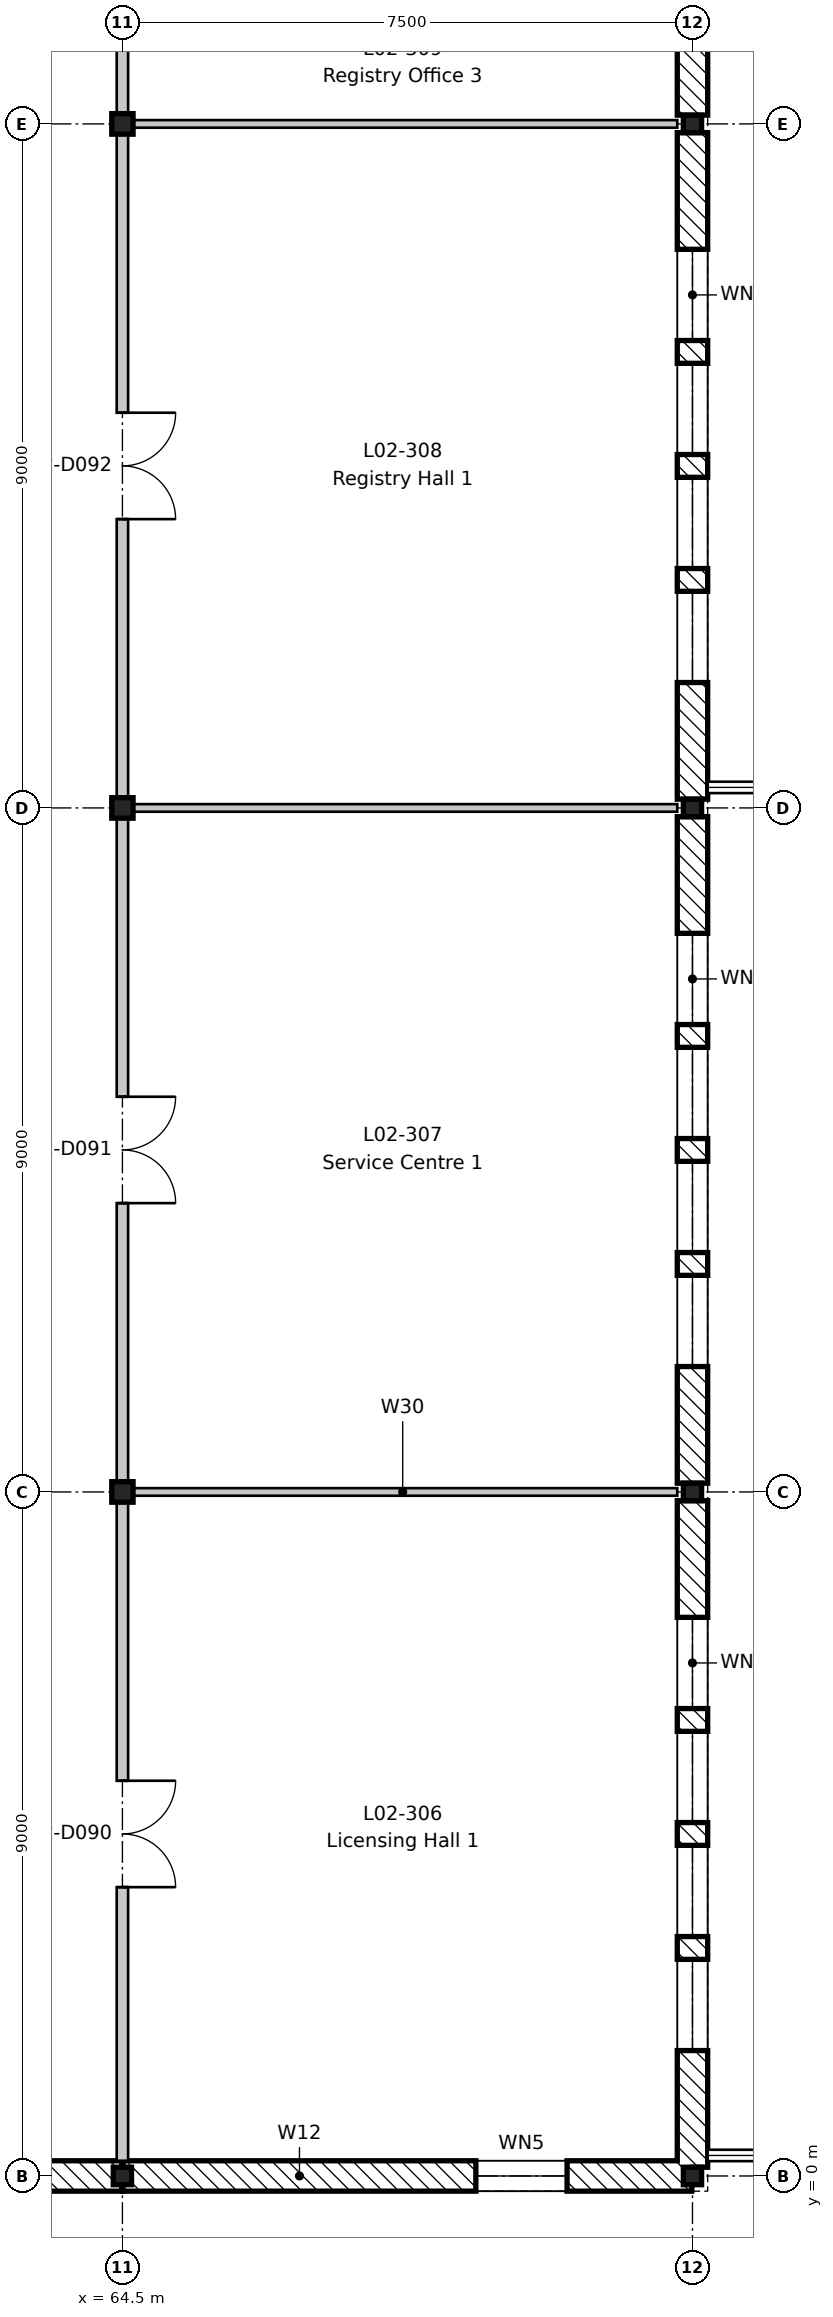
"""IFC4 building model, lengths in metres.
Left out: names, types, materials, properties, quantities, classifications, styles, units other than length and angle.
Written with IfcOpenShell. Run it as: python <this file> out.ifc"""

import sys

from ifc_helpers import new_model, si_unit, direction, frame, frame_2d, origin, origin_2d, place, context, subcontext, project, spatial, rectangle, i_section, extrude, element, fill, save


model = new_model("IFC4")
c1 = context("Model", 3, precision=1e-05, world=origin(), true_north=direction((0.0, 1.0)))
c2 = subcontext(c1, "Body", "Model", "MODEL_VIEW")
j1 = project(units=[si_unit("LENGTHUNIT", "METRE"), si_unit("PLANEANGLEUNIT", "RADIAN")], contexts=[c1])
p1 = place(None, origin())
s1 = spatial("IfcSite", under=j1, at=p1, CompositionType="ELEMENT")
p2 = place(p1, origin())
s2 = spatial("IfcBuilding", under=s1, at=p2, CompositionType="ELEMENT")
p3 = place(p2, frame((0.0, 0.0, 9.9)))
s3 = spatial("IfcBuildingStorey", under=s2, at=p3, CompositionType="ELEMENT", Elevation=9.9)
p4 = place(p3, frame((64.5, 0.0, -0.2), z_axis=(0.0, 0.0, 1.0), x_axis=(1.0, 0.0, 0.0)))
e1 = element("IfcColumn", 1, at=p4, inside=s3, PredefinedType="COLUMN", context=c2, shape_type="SweptSolid", body=[
    extrude(i_section(OverallWidth=0.24, OverallDepth=0.23, WebThickness=0.008, FlangeThickness=0.012, FilletRadius=0.021, at=origin_2d()), origin(), (0.0, 0.0, 1.0), 4.5),
])
for number, where, z_axis, x_axis in (
    (2, (64.5, 9.0, -0.2), (0.0, 0.0, 1.0), (1.0, 0.0, 0.0)),
    (3, (64.5, 18.0, -0.2), (0.0, 0.0, 1.0), (1.0, 0.0, 0.0)),
    (4, (64.5, 27.0, -0.2), (0.0, 0.0, 1.0), (1.0, 0.0, 0.0)),
):
    element("IfcColumn", number, at=place(p3, frame(where, z_axis=z_axis, x_axis=x_axis)), inside=s3, PredefinedType="COLUMN", context=c2, shape_type="SweptSolid", body=[
        extrude(i_section(OverallWidth=0.28, OverallDepth=0.27, WebThickness=0.008, FlangeThickness=0.013, FilletRadius=0.024, at=origin_2d()), origin(), (0.0, 0.0, 1.0), 4.5),
    ])
for number, where, z_axis, x_axis in (
    (5, (72.0, 0.0, -0.2), (0.0, 0.0, 1.0), (1.0, 0.0, 0.0)),
    (6, (72.0, 9.0, -0.2), (0.0, 0.0, 1.0), (1.0, 0.0, 0.0)),
    (7, (72.0, 18.0, -0.2), (0.0, 0.0, 1.0), (1.0, 0.0, 0.0)),
    (8, (72.0, 27.0, -0.2), (0.0, 0.0, 1.0), (1.0, 0.0, 0.0)),
):
    element("IfcColumn", number, at=place(p3, frame(where, z_axis=z_axis, x_axis=x_axis)), inside=s3, PredefinedType="COLUMN", context=c2, shape_type="SweptSolid", body=[
        extrude(i_section(OverallWidth=0.24, OverallDepth=0.23, WebThickness=0.008, FlangeThickness=0.012, FilletRadius=0.021, at=origin_2d()), origin(), (0.0, 0.0, 1.0), 4.5),
    ])
p5 = place(p3, frame((72.0, 8.885, 0.0), z_axis=(0.0, 0.0, 1.0), x_axis=(0.0, -1.0, 0.0)))
e9 = element("IfcWall", 9, at=p5, inside=s3, PredefinedType="STANDARD", context=c2, shape_type="SweptSolid", body=[
    extrude(rectangle(XDim=8.77, YDim=0.4, at=frame_2d((4.385, 0.0))), origin(), (0.0, 0.0, 1.0), 3.9),
])
p6 = place(p5, frame((6.035, 0.0, 0.6)))
e10 = element("IfcOpeningElement", 10, at=p6, cuts=e9, PredefinedType="OPENING", context=c2, shape_type="SweptSolid", body=[
    extrude(rectangle(XDim=1.2, YDim=3.0, at=frame_2d((0.6, 1.5))), frame((0.0, 0.21, 0.0), z_axis=(0.0, -1.0, 0.0), x_axis=(1.0, 0.0, 0.0)), (0.0, 0.0, 1.0), 0.42),
])
p7 = place(p5, frame((4.535, 0.0, 0.6)))
e11 = element("IfcOpeningElement", 11, at=p7, cuts=e9, PredefinedType="OPENING", context=c2, shape_type="SweptSolid", body=[
    extrude(rectangle(XDim=1.2, YDim=3.0, at=frame_2d((0.6, 1.5))), frame((0.0, 0.21, 0.0), z_axis=(0.0, -1.0, 0.0), x_axis=(1.0, 0.0, 0.0)), (0.0, 0.0, 1.0), 0.42),
])
p8 = place(p5, frame((3.035, 0.0, 0.6)))
e12 = element("IfcOpeningElement", 12, at=p8, cuts=e9, PredefinedType="OPENING", context=c2, shape_type="SweptSolid", body=[
    extrude(rectangle(XDim=1.2, YDim=3.0, at=frame_2d((0.6, 1.5))), frame((0.0, 0.21, 0.0), z_axis=(0.0, -1.0, 0.0), x_axis=(1.0, 0.0, 0.0)), (0.0, 0.0, 1.0), 0.42),
])
p9 = place(p5, frame((1.535, 0.0, 0.6)))
e13 = element("IfcOpeningElement", 13, at=p9, cuts=e9, PredefinedType="OPENING", context=c2, shape_type="SweptSolid", body=[
    extrude(rectangle(XDim=1.2, YDim=3.0, at=frame_2d((0.6, 1.5))), frame((0.0, 0.21, 0.0), z_axis=(0.0, -1.0, 0.0), x_axis=(1.0, 0.0, 0.0)), (0.0, 0.0, 1.0), 0.42),
])
p10 = place(p3, frame((72.0, 17.885, 0.0), z_axis=(0.0, 0.0, 1.0), x_axis=(0.0, -1.0, 0.0)))
e14 = element("IfcWall", 14, at=p10, inside=s3, PredefinedType="STANDARD", context=c2, shape_type="SweptSolid", body=[
    extrude(rectangle(XDim=8.77, YDim=0.4, at=frame_2d((4.385, 0.0))), origin(), (0.0, 0.0, 1.0), 3.9),
])
p11 = place(p10, frame((6.035, 0.0, 0.6)))
e15 = element("IfcOpeningElement", 15, at=p11, cuts=e14, PredefinedType="OPENING", context=c2, shape_type="SweptSolid", body=[
    extrude(rectangle(XDim=1.2, YDim=3.0, at=frame_2d((0.6, 1.5))), frame((0.0, 0.21, 0.0), z_axis=(0.0, -1.0, 0.0), x_axis=(1.0, 0.0, 0.0)), (0.0, 0.0, 1.0), 0.42),
])
p12 = place(p10, frame((4.535, 0.0, 0.6)))
e16 = element("IfcOpeningElement", 16, at=p12, cuts=e14, PredefinedType="OPENING", context=c2, shape_type="SweptSolid", body=[
    extrude(rectangle(XDim=1.2, YDim=3.0, at=frame_2d((0.6, 1.5))), frame((0.0, 0.21, 0.0), z_axis=(0.0, -1.0, 0.0), x_axis=(1.0, 0.0, 0.0)), (0.0, 0.0, 1.0), 0.42),
])
p13 = place(p10, frame((3.035, 0.0, 0.6)))
e17 = element("IfcOpeningElement", 17, at=p13, cuts=e14, PredefinedType="OPENING", context=c2, shape_type="SweptSolid", body=[
    extrude(rectangle(XDim=1.2, YDim=3.0, at=frame_2d((0.6, 1.5))), frame((0.0, 0.21, 0.0), z_axis=(0.0, -1.0, 0.0), x_axis=(1.0, 0.0, 0.0)), (0.0, 0.0, 1.0), 0.42),
])
p14 = place(p10, frame((1.535, 0.0, 0.6)))
e18 = element("IfcOpeningElement", 18, at=p14, cuts=e14, PredefinedType="OPENING", context=c2, shape_type="SweptSolid", body=[
    extrude(rectangle(XDim=1.2, YDim=3.0, at=frame_2d((0.6, 1.5))), frame((0.0, 0.21, 0.0), z_axis=(0.0, -1.0, 0.0), x_axis=(1.0, 0.0, 0.0)), (0.0, 0.0, 1.0), 0.42),
])
p15 = place(p3, frame((72.0, 26.885, 0.0), z_axis=(0.0, 0.0, 1.0), x_axis=(0.0, -1.0, 0.0)))
e19 = element("IfcWall", 19, at=p15, inside=s3, PredefinedType="STANDARD", context=c2, shape_type="SweptSolid", body=[
    extrude(rectangle(XDim=8.77, YDim=0.4, at=frame_2d((4.385, 0.0))), origin(), (0.0, 0.0, 1.0), 3.9),
])
p16 = place(p15, frame((6.035, 0.0, 0.6)))
e20 = element("IfcOpeningElement", 20, at=p16, cuts=e19, PredefinedType="OPENING", context=c2, shape_type="SweptSolid", body=[
    extrude(rectangle(XDim=1.2, YDim=3.0, at=frame_2d((0.6, 1.5))), frame((0.0, 0.21, 0.0), z_axis=(0.0, -1.0, 0.0), x_axis=(1.0, 0.0, 0.0)), (0.0, 0.0, 1.0), 0.42),
])
p17 = place(p15, frame((4.535, 0.0, 0.6)))
e21 = element("IfcOpeningElement", 21, at=p17, cuts=e19, PredefinedType="OPENING", context=c2, shape_type="SweptSolid", body=[
    extrude(rectangle(XDim=1.2, YDim=3.0, at=frame_2d((0.6, 1.5))), frame((0.0, 0.21, 0.0), z_axis=(0.0, -1.0, 0.0), x_axis=(1.0, 0.0, 0.0)), (0.0, 0.0, 1.0), 0.42),
])
p18 = place(p15, frame((3.035, 0.0, 0.6)))
e22 = element("IfcOpeningElement", 22, at=p18, cuts=e19, PredefinedType="OPENING", context=c2, shape_type="SweptSolid", body=[
    extrude(rectangle(XDim=1.2, YDim=3.0, at=frame_2d((0.6, 1.5))), frame((0.0, 0.21, 0.0), z_axis=(0.0, -1.0, 0.0), x_axis=(1.0, 0.0, 0.0)), (0.0, 0.0, 1.0), 0.42),
])
p19 = place(p15, frame((1.535, 0.0, 0.6)))
e23 = element("IfcOpeningElement", 23, at=p19, cuts=e19, PredefinedType="OPENING", context=c2, shape_type="SweptSolid", body=[
    extrude(rectangle(XDim=1.2, YDim=3.0, at=frame_2d((0.6, 1.5))), frame((0.0, 0.21, 0.0), z_axis=(0.0, -1.0, 0.0), x_axis=(1.0, 0.0, 0.0)), (0.0, 0.0, 1.0), 0.42),
])
p20 = place(p3, frame((72.0, 35.885, 0.0), z_axis=(0.0, 0.0, 1.0), x_axis=(0.0, -1.0, 0.0)))
e24 = element("IfcWall", 24, at=p20, inside=s3, PredefinedType="STANDARD", context=c2, shape_type="SweptSolid", body=[
    extrude(rectangle(XDim=8.77, YDim=0.4, at=frame_2d((4.385, 0.0))), origin(), (0.0, 0.0, 1.0), 3.9),
])
p21 = place(p20, frame((6.035, 0.0, 0.6)))
e25 = element("IfcOpeningElement", 25, at=p21, cuts=e24, PredefinedType="OPENING", context=c2, shape_type="SweptSolid", body=[
    extrude(rectangle(XDim=1.2, YDim=3.0, at=frame_2d((0.6, 1.5))), frame((0.0, 0.21, 0.0), z_axis=(0.0, -1.0, 0.0), x_axis=(1.0, 0.0, 0.0)), (0.0, 0.0, 1.0), 0.42),
])
p22 = place(p20, frame((4.535, 0.0, 0.6)))
e26 = element("IfcOpeningElement", 26, at=p22, cuts=e24, PredefinedType="OPENING", context=c2, shape_type="SweptSolid", body=[
    extrude(rectangle(XDim=1.2, YDim=3.0, at=frame_2d((0.6, 1.5))), frame((0.0, 0.21, 0.0), z_axis=(0.0, -1.0, 0.0), x_axis=(1.0, 0.0, 0.0)), (0.0, 0.0, 1.0), 0.42),
])
p23 = place(p20, frame((3.035, 0.0, 0.6)))
e27 = element("IfcOpeningElement", 27, at=p23, cuts=e24, PredefinedType="OPENING", context=c2, shape_type="SweptSolid", body=[
    extrude(rectangle(XDim=1.2, YDim=3.0, at=frame_2d((0.6, 1.5))), frame((0.0, 0.21, 0.0), z_axis=(0.0, -1.0, 0.0), x_axis=(1.0, 0.0, 0.0)), (0.0, 0.0, 1.0), 0.42),
])
p24 = place(p20, frame((1.535, 0.0, 0.6)))
e28 = element("IfcOpeningElement", 28, at=p24, cuts=e24, PredefinedType="OPENING", context=c2, shape_type="SweptSolid", body=[
    extrude(rectangle(XDim=1.2, YDim=3.0, at=frame_2d((0.6, 1.5))), frame((0.0, 0.21, 0.0), z_axis=(0.0, -1.0, 0.0), x_axis=(1.0, 0.0, 0.0)), (0.0, 0.0, 1.0), 0.42),
])
p25 = place(p3, frame((64.491, 0.0, 0.0), z_axis=(0.0, 0.0, 1.0), x_axis=(-1.0, 0.0, 0.0)))
e29 = element("IfcWall", 29, at=p25, inside=s3, PredefinedType="STANDARD", context=c2, shape_type="SweptSolid", body=[
    extrude(rectangle(XDim=2.982, YDim=0.4, at=frame_2d((1.491, 0.0))), origin(), (0.0, 0.0, 1.0), 4.1),
])
p26 = place(p3, frame((71.991, 0.0, 0.0), z_axis=(0.0, 0.0, 1.0), x_axis=(-1.0, 0.0, 0.0)))
e30 = element("IfcWall", 30, at=p26, inside=s3, PredefinedType="STANDARD", context=c2, shape_type="SweptSolid", body=[
    extrude(rectangle(XDim=7.482, YDim=0.4, at=frame_2d((3.741, 0.0))), origin(), (0.0, 0.0, 1.0), 3.97),
])
p27 = place(p26, frame((1.641, 0.0, 0.6)))
e31 = element("IfcOpeningElement", 31, at=p27, cuts=e30, PredefinedType="OPENING", context=c2, shape_type="SweptSolid", body=[
    extrude(rectangle(XDim=1.2, YDim=3.0, at=frame_2d((0.6, 1.5))), frame((0.0, 0.21, 0.0), z_axis=(0.0, -1.0, 0.0), x_axis=(1.0, 0.0, 0.0)), (0.0, 0.0, 1.0), 0.42),
])
for number, where, z_axis, x_axis in (
    (32, (64.575, 9.0, 0.0), (0.0, 0.0, 1.0), (1.0, 0.0, 0.0)),
    (33, (64.575, 18.0, 0.0), (0.0, 0.0, 1.0), (1.0, 0.0, 0.0)),
    (34, (64.575, 27.0, 0.0), (0.0, 0.0, 1.0), (1.0, 0.0, 0.0)),
):
    element("IfcWall", number, at=place(p3, frame(where, z_axis=z_axis, x_axis=x_axis)), inside=s3, PredefinedType="PARTITIONING", context=c2, shape_type="SweptSolid", body=[
        extrude(rectangle(XDim=7.225, YDim=0.1, at=frame_2d((3.613, 0.0))), origin(), (0.0, 0.0, 1.0), 3.95),
    ])
p28 = place(p3, frame((64.5, 0.2, 0.0), z_axis=(0.0, 0.0, 1.0), x_axis=(0.0, 1.0, 0.0)))
e35 = element("IfcWall", 35, at=p28, inside=s3, PredefinedType="PARTITIONING", context=c2, shape_type="SweptSolid", body=[
    extrude(rectangle(XDim=53.6, YDim=0.15, at=frame_2d((26.8, 0.0))), origin(), (0.0, 0.0, 1.0), 3.78),
])
p29 = place(p28, frame((3.6, 0.0, 0.0)))
e36 = element("IfcOpeningElement", 36, at=p29, cuts=e35, PredefinedType="OPENING", context=c2, shape_type="SweptSolid", body=[
    extrude(rectangle(XDim=1.4, YDim=2.1, at=frame_2d((0.7, 1.05))), frame((0.0, 0.085, 0.0), z_axis=(0.0, -1.0, 0.0), x_axis=(1.0, 0.0, 0.0)), (0.0, 0.0, 1.0), 0.17),
])
p30 = place(p28, frame((12.6, 0.0, 0.0)))
e37 = element("IfcOpeningElement", 37, at=p30, cuts=e35, PredefinedType="OPENING", context=c2, shape_type="SweptSolid", body=[
    extrude(rectangle(XDim=1.4, YDim=2.1, at=frame_2d((0.7, 1.05))), frame((0.0, 0.085, 0.0), z_axis=(0.0, -1.0, 0.0), x_axis=(1.0, 0.0, 0.0)), (0.0, 0.0, 1.0), 0.17),
])
p31 = place(p28, frame((21.6, 0.0, 0.0)))
e38 = element("IfcOpeningElement", 38, at=p31, cuts=e35, PredefinedType="OPENING", context=c2, shape_type="SweptSolid", body=[
    extrude(rectangle(XDim=1.4, YDim=2.1, at=frame_2d((0.7, 1.05))), frame((0.0, 0.085, 0.0), z_axis=(0.0, -1.0, 0.0), x_axis=(1.0, 0.0, 0.0)), (0.0, 0.0, 1.0), 0.17),
])
p32 = place(p28, frame((27.8, 0.0, 0.0)))
e39 = element("IfcOpeningElement", 39, at=p32, cuts=e35, PredefinedType="OPENING", context=c2, shape_type="SweptSolid", body=[
    extrude(rectangle(XDim=1.0, YDim=2.1, at=frame_2d((0.5, 1.05))), frame((0.0, 0.085, 0.0), z_axis=(0.0, -1.0, 0.0), x_axis=(1.0, 0.0, 0.0)), (0.0, 0.0, 1.0), 0.17),
])
p33 = place(p28, frame((32.3, 0.0, 0.0)))
e40 = element("IfcOpeningElement", 40, at=p33, cuts=e35, PredefinedType="OPENING", context=c2, shape_type="SweptSolid", body=[
    extrude(rectangle(XDim=1.0, YDim=2.1, at=frame_2d((0.5, 1.05))), frame((0.0, 0.085, 0.0), z_axis=(0.0, -1.0, 0.0), x_axis=(1.0, 0.0, 0.0)), (0.0, 0.0, 1.0), 0.17),
])
p34 = place(p28, frame((39.6, 0.0, 0.0)))
e41 = element("IfcOpeningElement", 41, at=p34, cuts=e35, PredefinedType="OPENING", context=c2, shape_type="SweptSolid", body=[
    extrude(rectangle(XDim=1.4, YDim=2.1, at=frame_2d((0.7, 1.05))), frame((0.0, 0.085, 0.0), z_axis=(0.0, -1.0, 0.0), x_axis=(1.0, 0.0, 0.0)), (0.0, 0.0, 1.0), 0.17),
])
p35 = place(p28, frame((48.6, 0.0, 0.0)))
e42 = element("IfcOpeningElement", 42, at=p35, cuts=e35, PredefinedType="OPENING", context=c2, shape_type="SweptSolid", body=[
    extrude(rectangle(XDim=1.4, YDim=2.1, at=frame_2d((0.7, 1.05))), frame((0.0, 0.085, 0.0), z_axis=(0.0, -1.0, 0.0), x_axis=(1.0, 0.0, 0.0)), (0.0, 0.0, 1.0), 0.17),
])
p36 = place(p6, origin())
e43 = element("IfcWindow", 43, at=p36, inside=s3, PartitioningType="SINGLE_PANEL", PredefinedType="WINDOW", context=c2, shape_type="SweptSolid", body=[
    extrude(rectangle(XDim=1.2, YDim=3.0, at=frame_2d((0.6, 1.5))), frame((0.0, 0.03, 0.0), z_axis=(0.0, -1.0, 0.0), x_axis=(1.0, 0.0, 0.0)), (0.0, 0.0, 1.0), 0.06),
])
fill(e10, e43)
p37 = place(p7, origin())
e44 = element("IfcWindow", 44, at=p37, inside=s3, PartitioningType="SINGLE_PANEL", PredefinedType="WINDOW", context=c2, shape_type="SweptSolid", body=[
    extrude(rectangle(XDim=1.2, YDim=3.0, at=frame_2d((0.6, 1.5))), frame((0.0, 0.03, 0.0), z_axis=(0.0, -1.0, 0.0), x_axis=(1.0, 0.0, 0.0)), (0.0, 0.0, 1.0), 0.06),
])
fill(e11, e44)
p38 = place(p8, origin())
e45 = element("IfcWindow", 45, at=p38, inside=s3, PartitioningType="SINGLE_PANEL", PredefinedType="WINDOW", context=c2, shape_type="SweptSolid", body=[
    extrude(rectangle(XDim=1.2, YDim=3.0, at=frame_2d((0.6, 1.5))), frame((0.0, 0.03, 0.0), z_axis=(0.0, -1.0, 0.0), x_axis=(1.0, 0.0, 0.0)), (0.0, 0.0, 1.0), 0.06),
])
fill(e12, e45)
p39 = place(p9, origin())
e46 = element("IfcWindow", 46, at=p39, inside=s3, PartitioningType="SINGLE_PANEL", PredefinedType="WINDOW", context=c2, shape_type="SweptSolid", body=[
    extrude(rectangle(XDim=1.2, YDim=3.0, at=frame_2d((0.6, 1.5))), frame((0.0, 0.03, 0.0), z_axis=(0.0, -1.0, 0.0), x_axis=(1.0, 0.0, 0.0)), (0.0, 0.0, 1.0), 0.06),
])
fill(e13, e46)
p40 = place(p11, origin())
e47 = element("IfcWindow", 47, at=p40, inside=s3, PartitioningType="SINGLE_PANEL", PredefinedType="WINDOW", context=c2, shape_type="SweptSolid", body=[
    extrude(rectangle(XDim=1.2, YDim=3.0, at=frame_2d((0.6, 1.5))), frame((0.0, 0.03, 0.0), z_axis=(0.0, -1.0, 0.0), x_axis=(1.0, 0.0, 0.0)), (0.0, 0.0, 1.0), 0.06),
])
fill(e15, e47)
p41 = place(p12, origin())
e48 = element("IfcWindow", 48, at=p41, inside=s3, PartitioningType="SINGLE_PANEL", PredefinedType="WINDOW", context=c2, shape_type="SweptSolid", body=[
    extrude(rectangle(XDim=1.2, YDim=3.0, at=frame_2d((0.6, 1.5))), frame((0.0, 0.03, 0.0), z_axis=(0.0, -1.0, 0.0), x_axis=(1.0, 0.0, 0.0)), (0.0, 0.0, 1.0), 0.06),
])
fill(e16, e48)
p42 = place(p13, origin())
e49 = element("IfcWindow", 49, at=p42, inside=s3, PartitioningType="SINGLE_PANEL", PredefinedType="WINDOW", context=c2, shape_type="SweptSolid", body=[
    extrude(rectangle(XDim=1.2, YDim=3.0, at=frame_2d((0.6, 1.5))), frame((0.0, 0.03, 0.0), z_axis=(0.0, -1.0, 0.0), x_axis=(1.0, 0.0, 0.0)), (0.0, 0.0, 1.0), 0.06),
])
fill(e17, e49)
p43 = place(p14, origin())
e50 = element("IfcWindow", 50, at=p43, inside=s3, PartitioningType="SINGLE_PANEL", PredefinedType="WINDOW", context=c2, shape_type="SweptSolid", body=[
    extrude(rectangle(XDim=1.2, YDim=3.0, at=frame_2d((0.6, 1.5))), frame((0.0, 0.03, 0.0), z_axis=(0.0, -1.0, 0.0), x_axis=(1.0, 0.0, 0.0)), (0.0, 0.0, 1.0), 0.06),
])
fill(e18, e50)
p44 = place(p16, origin())
e51 = element("IfcWindow", 51, at=p44, inside=s3, PartitioningType="SINGLE_PANEL", PredefinedType="WINDOW", context=c2, shape_type="SweptSolid", body=[
    extrude(rectangle(XDim=1.2, YDim=3.0, at=frame_2d((0.6, 1.5))), frame((0.0, 0.03, 0.0), z_axis=(0.0, -1.0, 0.0), x_axis=(1.0, 0.0, 0.0)), (0.0, 0.0, 1.0), 0.06),
])
fill(e20, e51)
p45 = place(p17, origin())
e52 = element("IfcWindow", 52, at=p45, inside=s3, PartitioningType="SINGLE_PANEL", PredefinedType="WINDOW", context=c2, shape_type="SweptSolid", body=[
    extrude(rectangle(XDim=1.2, YDim=3.0, at=frame_2d((0.6, 1.5))), frame((0.0, 0.03, 0.0), z_axis=(0.0, -1.0, 0.0), x_axis=(1.0, 0.0, 0.0)), (0.0, 0.0, 1.0), 0.06),
])
fill(e21, e52)
p46 = place(p18, origin())
e53 = element("IfcWindow", 53, at=p46, inside=s3, PartitioningType="SINGLE_PANEL", PredefinedType="WINDOW", context=c2, shape_type="SweptSolid", body=[
    extrude(rectangle(XDim=1.2, YDim=3.0, at=frame_2d((0.6, 1.5))), frame((0.0, 0.03, 0.0), z_axis=(0.0, -1.0, 0.0), x_axis=(1.0, 0.0, 0.0)), (0.0, 0.0, 1.0), 0.06),
])
fill(e22, e53)
p47 = place(p19, origin())
e54 = element("IfcWindow", 54, at=p47, inside=s3, PartitioningType="SINGLE_PANEL", PredefinedType="WINDOW", context=c2, shape_type="SweptSolid", body=[
    extrude(rectangle(XDim=1.2, YDim=3.0, at=frame_2d((0.6, 1.5))), frame((0.0, 0.03, 0.0), z_axis=(0.0, -1.0, 0.0), x_axis=(1.0, 0.0, 0.0)), (0.0, 0.0, 1.0), 0.06),
])
fill(e23, e54)
p48 = place(p27, origin())
e55 = element("IfcWindow", 55, at=p48, inside=s3, PartitioningType="SINGLE_PANEL", PredefinedType="WINDOW", context=c2, shape_type="SweptSolid", body=[
    extrude(rectangle(XDim=1.2, YDim=3.0, at=frame_2d((0.6, 1.5))), frame((0.0, 0.03, 0.0), z_axis=(0.0, -1.0, 0.0), x_axis=(1.0, 0.0, 0.0)), (0.0, 0.0, 1.0), 0.06),
])
fill(e31, e55)
p49 = place(p29, frame((1.4, 0.0, 0.0), z_axis=(0.0, 0.0, 1.0), x_axis=(-1.0, 0.0, 0.0)))
e56 = element("IfcDoor", 56, at=p49, inside=s3, OperationType="DOUBLE_DOOR_SINGLE_SWING", PredefinedType="DOOR", context=c2, shape_type="SweptSolid", body=[
    extrude(rectangle(XDim=1.4, YDim=2.1, at=frame_2d((0.7, 1.05))), frame((0.0, 0.025, 0.0), z_axis=(0.0, -1.0, 0.0), x_axis=(1.0, 0.0, 0.0)), (0.0, 0.0, 1.0), 0.05),
])
fill(e36, e56)
p50 = place(p30, frame((1.4, 0.0, 0.0), z_axis=(0.0, 0.0, 1.0), x_axis=(-1.0, 0.0, 0.0)))
e57 = element("IfcDoor", 57, at=p50, inside=s3, OperationType="DOUBLE_DOOR_SINGLE_SWING", PredefinedType="DOOR", context=c2, shape_type="SweptSolid", body=[
    extrude(rectangle(XDim=1.4, YDim=2.1, at=frame_2d((0.7, 1.05))), frame((0.0, 0.025, 0.0), z_axis=(0.0, -1.0, 0.0), x_axis=(1.0, 0.0, 0.0)), (0.0, 0.0, 1.0), 0.05),
])
fill(e37, e57)
p51 = place(p31, frame((1.4, 0.0, 0.0), z_axis=(0.0, 0.0, 1.0), x_axis=(-1.0, 0.0, 0.0)))
e58 = element("IfcDoor", 58, at=p51, inside=s3, OperationType="DOUBLE_DOOR_SINGLE_SWING", PredefinedType="DOOR", context=c2, shape_type="SweptSolid", body=[
    extrude(rectangle(XDim=1.4, YDim=2.1, at=frame_2d((0.7, 1.05))), frame((0.0, 0.025, 0.0), z_axis=(0.0, -1.0, 0.0), x_axis=(1.0, 0.0, 0.0)), (0.0, 0.0, 1.0), 0.05),
])
fill(e38, e58)
save(model, sys.argv[1])
